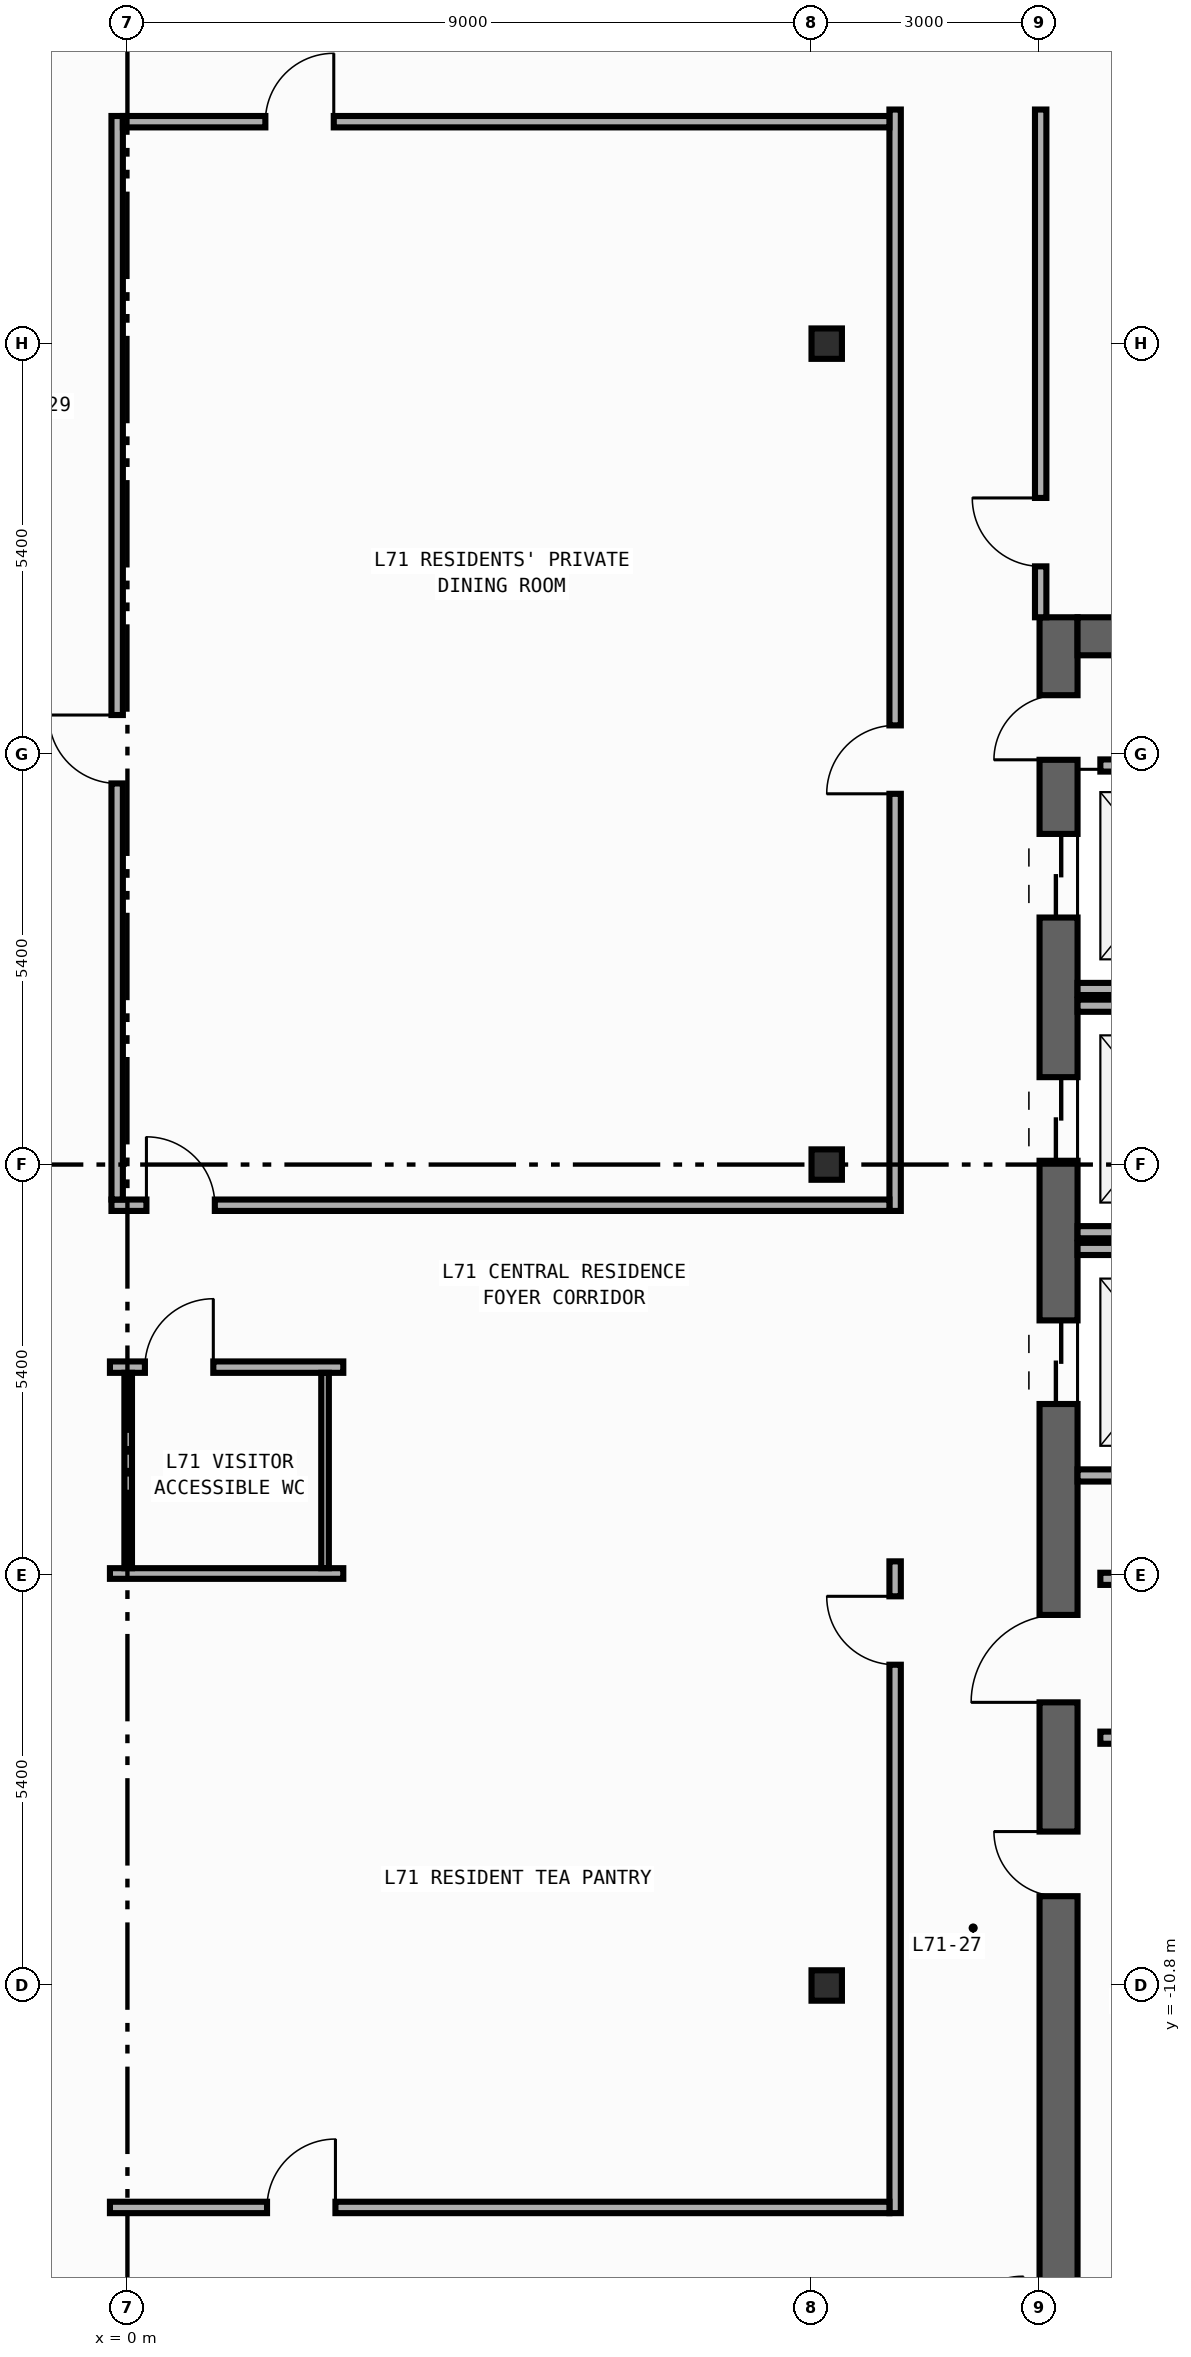
"""IFC4 building model, lengths in metres.
Left out: names, types, materials, properties, quantities, classifications, styles, units other than length and angle.
Written with IfcOpenShell. Run it as: python <this file> out.ifc"""

import sys

from ifc_helpers import new_model, si_unit, direction, frame, frame_2d, origin, origin_2d, place, context, subcontext, project, spatial, rectangle, i_section, extrude, element, fill, save


model = new_model("IFC4")
c1 = context("Model", 3, precision=1e-05, world=origin(), true_north=direction((0.0, 1.0)))
c2 = subcontext(c1, "Body", "Model", "MODEL_VIEW")
j1 = project(units=[si_unit("LENGTHUNIT", "METRE"), si_unit("PLANEANGLEUNIT", "RADIAN")], contexts=[c1])
p1 = place(None, origin())
s1 = spatial("IfcSite", under=j1, at=p1, CompositionType="ELEMENT")
p2 = place(p1, origin())
s2 = spatial("IfcBuilding", under=s1, at=p2, CompositionType="ELEMENT")
p3 = place(p2, frame((0.0, 0.0, 296.6)))
s3 = spatial("IfcBuildingStorey", under=s2, at=p3, CompositionType="ELEMENT", Elevation=296.6)
p4 = place(p3, frame((12.25, -19.8, 0.0), z_axis=(0.0, 0.0, 1.0), x_axis=(0.0, 1.0, 0.0)))
e1 = element("IfcWall", 1, at=p4, inside=s3, PredefinedType="SHEAR", context=c2, shape_type="SweptSolid", body=[
    extrude(rectangle(XDim=27.0, YDim=0.5, at=frame_2d((13.5, 0.0))), origin(), (0.0, 0.0, 1.0), 3.54),
])
p5 = place(p4, frame((23.05, 0.0, 0.0)))
e2 = element("IfcOpeningElement", 2, at=p5, cuts=e1, PredefinedType="OPENING", context=c2, shape_type="SweptSolid", body=[
    extrude(rectangle(XDim=1.1, YDim=2.2, at=frame_2d((0.55, 1.1))), frame((0.0, 0.26, 0.0), z_axis=(0.0, -1.0, 0.0), x_axis=(1.0, 0.0, 0.0)), (0.0, 0.0, 1.0), 0.52),
])
p6 = place(p4, frame((19.85, 0.0, 0.0)))
e3 = element("IfcOpeningElement", 3, at=p6, cuts=e1, PredefinedType="OPENING", context=c2, shape_type="SweptSolid", body=[
    extrude(rectangle(XDim=1.1, YDim=2.2, at=frame_2d((0.55, 1.1))), frame((0.0, 0.26, 0.0), z_axis=(0.0, -1.0, 0.0), x_axis=(1.0, 0.0, 0.0)), (0.0, 0.0, 1.0), 0.52),
])
p7 = place(p4, frame((16.65, 0.0, 0.0)))
e4 = element("IfcOpeningElement", 4, at=p7, cuts=e1, PredefinedType="OPENING", context=c2, shape_type="SweptSolid", body=[
    extrude(rectangle(XDim=1.1, YDim=2.2, at=frame_2d((0.55, 1.1))), frame((0.0, 0.26, 0.0), z_axis=(0.0, -1.0, 0.0), x_axis=(1.0, 0.0, 0.0)), (0.0, 0.0, 1.0), 0.52),
])
p8 = place(p4, frame((10.175, 0.0, 0.0)))
e5 = element("IfcOpeningElement", 5, at=p8, cuts=e1, PredefinedType="OPENING", context=c2, shape_type="SweptSolid", body=[
    extrude(rectangle(XDim=0.85, YDim=2.1, at=frame_2d((0.425, 1.05))), frame((0.0, 0.26, 0.0), z_axis=(0.0, -1.0, 0.0), x_axis=(1.0, 0.0, 0.0)), (0.0, 0.0, 1.0), 0.52),
])
p9 = place(p4, frame((12.725, 0.0, 0.0)))
e6 = element("IfcOpeningElement", 6, at=p9, cuts=e1, PredefinedType="OPENING", context=c2, shape_type="SweptSolid", body=[
    extrude(rectangle(XDim=1.15, YDim=2.2, at=frame_2d((0.575, 1.1))), frame((0.0, 0.26, 0.0), z_axis=(0.0, -1.0, 0.0), x_axis=(1.0, 0.0, 0.0)), (0.0, 0.0, 1.0), 0.52),
])
p10 = place(p4, frame((25.125, 0.0, 0.0)))
e7 = element("IfcOpeningElement", 7, at=p10, cuts=e1, PredefinedType="OPENING", context=c2, shape_type="SweptSolid", body=[
    extrude(rectangle(XDim=0.85, YDim=2.1, at=frame_2d((0.425, 1.05))), frame((0.0, 0.26, 0.0), z_axis=(0.0, -1.0, 0.0), x_axis=(1.0, 0.0, 0.0)), (0.0, 0.0, 1.0), 0.52),
])
p11 = place(p3, frame((12.5, 6.95, 0.0), z_axis=(0.0, 0.0, 1.0), x_axis=(1.0, 0.0, 0.0)))
e8 = element("IfcWall", 8, at=p11, inside=s3, PredefinedType="SHEAR", context=c2, shape_type="SweptSolid", body=[
    extrude(rectangle(XDim=7.4, YDim=0.5, at=frame_2d((3.7, 0.0))), origin(), (0.0, 0.0, 1.0), 3.54),
])
for number, where, z_axis, x_axis in (
    (9, (9.2, -10.8, 0.0), (0.0, 0.0, 1.0), (1.0, 0.0, 0.0)),
    (10, (9.2, 0.0, 0.0), (0.0, 0.0, 1.0), (1.0, 0.0, 0.0)),
    (11, (9.2, 10.8, 0.0), (0.0, 0.0, 1.0), (1.0, 0.0, 0.0)),
):
    element("IfcColumn", number, at=place(p3, frame(where, z_axis=z_axis, x_axis=x_axis)), inside=s3, PredefinedType="COLUMN", context=c2, shape_type="SweptSolid", body=[
        extrude(i_section(OverallWidth=0.4, OverallDepth=0.4, WebThickness=0.013, FlangeThickness=0.021, FilletRadius=0.022, at=origin_2d()), origin(), (0.0, 0.0, 1.0), 3.8),
    ])
for number, where, z_axis, x_axis in (
    (12, (12.5, 2.31, 0.0), (0.0, 0.0, 1.0), (1.0, 0.0, 0.0)),
    (13, (12.5, -0.89, 0.0), (0.0, 0.0, 1.0), (1.0, 0.0, 0.0)),
    (14, (12.5, 2.09, 0.0), (0.0, 0.0, 1.0), (1.0, 0.0, 0.0)),
    (15, (12.5, -4.09, 0.0), (0.0, 0.0, 1.0), (1.0, 0.0, 0.0)),
    (16, (12.5, -1.11, 0.0), (0.0, 0.0, 1.0), (1.0, 0.0, 0.0)),
):
    element("IfcWall", number, at=place(p3, frame(where, z_axis=z_axis, x_axis=x_axis)), inside=s3, PredefinedType="STANDARD", context=c2, shape_type="SweptSolid", body=[
        extrude(rectangle(XDim=2.49, YDim=0.16, at=frame_2d((1.245, 0.0))), origin(), (0.0, 0.0, 1.0), 3.54),
    ])
for number, where, z_axis, x_axis in (
    (17, (12.8, -5.45, 0.0), (0.0, 0.0, 1.0), (1.0, 0.0, 0.0)),
    (18, (12.8, -7.54, 0.0), (0.0, 0.0, 1.0), (1.0, 0.0, 0.0)),
    (19, (12.8, 5.25, 0.0), (0.0, 0.0, 1.0), (1.0, 0.0, 0.0)),
):
    element("IfcWall", number, at=place(p3, frame(where, z_axis=z_axis, x_axis=x_axis)), inside=s3, PredefinedType="STANDARD", context=c2, shape_type="SweptSolid", body=[
        extrude(rectangle(XDim=2.6, YDim=0.16, at=frame_2d((1.3, 0.0))), origin(), (0.0, 0.0, 1.0), 3.54),
    ])
p12 = place(p3, frame((12.015, 7.2, 0.0), z_axis=(0.0, 0.0, 1.0), x_axis=(0.0, 1.0, 0.0)))
e20 = element("IfcWall", 20, at=p12, inside=s3, PredefinedType="PARTITIONING", context=c2, shape_type="SweptSolid", body=[
    extrude(rectangle(XDim=6.68, YDim=0.15, at=frame_2d((3.34, 0.0))), origin(), (0.0, 0.0, 1.0), 3.54),
])
p13 = place(p12, frame((0.67, 0.0, 0.0)))
e21 = element("IfcOpeningElement", 21, at=p13, cuts=e20, PredefinedType="OPENING", context=c2, shape_type="SweptSolid", body=[
    extrude(rectangle(XDim=0.9, YDim=2.15, at=frame_2d((0.45, 1.075))), frame((0.0, 0.085, 0.0), z_axis=(0.0, -1.0, 0.0), x_axis=(1.0, 0.0, 0.0)), (0.0, 0.0, 1.0), 0.17),
])
p14 = place(p3, frame((10.1, -0.61, 0.0), z_axis=(0.0, 0.0, 1.0), x_axis=(0.0, 1.0, 0.0)))
e22 = element("IfcWall", 22, at=p14, inside=s3, PredefinedType="PARTITIONING", context=c2, shape_type="SweptSolid", body=[
    extrude(rectangle(XDim=14.49, YDim=0.15, at=frame_2d((7.245, 0.0))), origin(), (0.0, 0.0, 1.0), 3.54),
])
p15 = place(p14, frame((5.488, 0.0, 0.0)))
e23 = element("IfcOpeningElement", 23, at=p15, cuts=e22, PredefinedType="OPENING", context=c2, shape_type="SweptSolid", body=[
    extrude(rectangle(XDim=0.9, YDim=2.15, at=frame_2d((0.45, 1.075))), frame((0.0, 0.085, 0.0), z_axis=(0.0, -1.0, 0.0), x_axis=(1.0, 0.0, 0.0)), (0.0, 0.0, 1.0), 0.17),
])
p16 = place(p3, frame((10.1, -13.795, 0.0), z_axis=(0.0, 0.0, 1.0), x_axis=(0.0, 1.0, 0.0)))
e24 = element("IfcWall", 24, at=p16, inside=s3, PredefinedType="PARTITIONING", context=c2, shape_type="SweptSolid", body=[
    extrude(rectangle(XDim=8.575, YDim=0.15, at=frame_2d((4.288, 0.0))), origin(), (0.0, 0.0, 1.0), 3.54),
])
p17 = place(p16, frame((7.215, 0.0, 0.0)))
e25 = element("IfcOpeningElement", 25, at=p17, cuts=e24, PredefinedType="OPENING", context=c2, shape_type="SweptSolid", body=[
    extrude(rectangle(XDim=0.9, YDim=2.15, at=frame_2d((0.45, 1.075))), frame((0.0, 0.085, 0.0), z_axis=(0.0, -1.0, 0.0), x_axis=(1.0, 0.0, 0.0)), (0.0, 0.0, 1.0), 0.17),
])
p18 = place(p3, frame((-0.21, -0.535, 0.0), z_axis=(0.0, 0.0, 1.0), x_axis=(1.0, 0.0, 0.0)))
e26 = element("IfcWall", 26, at=p18, inside=s3, PredefinedType="PARTITIONING", context=c2, shape_type="SweptSolid", body=[
    extrude(rectangle(XDim=10.235, YDim=0.15, at=frame_2d((5.117, 0.0))), origin(), (0.0, 0.0, 1.0), 3.54),
])
p19 = place(p18, frame((0.46, 0.0, 0.0)))
e27 = element("IfcOpeningElement", 27, at=p19, cuts=e26, PredefinedType="OPENING", context=c2, shape_type="SweptSolid", body=[
    extrude(rectangle(XDim=0.9, YDim=2.15, at=frame_2d((0.45, 1.075))), frame((0.0, 0.085, 0.0), z_axis=(0.0, -1.0, 0.0), x_axis=(1.0, 0.0, 0.0)), (0.0, 0.0, 1.0), 0.17),
])
p20 = place(p3, frame((-0.23, -2.665, 0.0), z_axis=(0.0, 0.0, 1.0), x_axis=(1.0, 0.0, 0.0)))
e28 = element("IfcWall", 28, at=p20, inside=s3, PredefinedType="PARTITIONING", context=c2, shape_type="SweptSolid", body=[
    extrude(rectangle(XDim=3.07, YDim=0.15, at=frame_2d((1.535, 0.0))), origin(), (0.0, 0.0, 1.0), 3.54),
])
p21 = place(p20, frame((0.46, 0.0, 0.0)))
e29 = element("IfcOpeningElement", 29, at=p21, cuts=e28, PredefinedType="OPENING", context=c2, shape_type="SweptSolid", body=[
    extrude(rectangle(XDim=0.9, YDim=2.15, at=frame_2d((0.45, 1.075))), frame((0.0, 0.085, 0.0), z_axis=(0.0, -1.0, 0.0), x_axis=(1.0, 0.0, 0.0)), (0.0, 0.0, 1.0), 0.17),
])
p22 = place(p3, frame((-0.135, -0.46, 0.0), z_axis=(0.0, 0.0, 1.0), x_axis=(0.0, 1.0, 0.0)))
e30 = element("IfcWall", 30, at=p22, inside=s3, PredefinedType="PARTITIONING", context=c2, shape_type="SweptSolid", body=[
    extrude(rectangle(XDim=14.255, YDim=0.15, at=frame_2d((7.127, 0.0))), origin(), (0.0, 0.0, 1.0), 3.54),
])
p23 = place(p22, frame((5.474, 0.0, 0.0)))
e31 = element("IfcOpeningElement", 31, at=p23, cuts=e30, PredefinedType="OPENING", context=c2, shape_type="SweptSolid", body=[
    extrude(rectangle(XDim=0.9, YDim=2.15, at=frame_2d((0.45, 1.075))), frame((0.0, 0.085, 0.0), z_axis=(0.0, -1.0, 0.0), x_axis=(1.0, 0.0, 0.0)), (0.0, 0.0, 1.0), 0.17),
])
p24 = place(p3, frame((-0.06, 13.72, 0.0), z_axis=(0.0, 0.0, 1.0), x_axis=(1.0, 0.0, 0.0)))
e32 = element("IfcWall", 32, at=p24, inside=s3, PredefinedType="PARTITIONING", context=c2, shape_type="SweptSolid", body=[
    extrude(rectangle(XDim=10.085, YDim=0.15, at=frame_2d((5.042, 0.0))), origin(), (0.0, 0.0, 1.0), 3.54),
])
p25 = place(p24, frame((1.875, 0.0, 0.0)))
e33 = element("IfcOpeningElement", 33, at=p25, cuts=e32, PredefinedType="OPENING", context=c2, shape_type="SweptSolid", body=[
    extrude(rectangle(XDim=0.9, YDim=2.15, at=frame_2d((0.45, 1.075))), frame((0.0, 0.085, 0.0), z_axis=(0.0, -1.0, 0.0), x_axis=(1.0, 0.0, 0.0)), (0.0, 0.0, 1.0), 0.17),
])
p26 = place(p3, frame((-0.23, -13.72, 0.0), z_axis=(0.0, 0.0, 1.0), x_axis=(1.0, 0.0, 0.0)))
e34 = element("IfcWall", 34, at=p26, inside=s3, PredefinedType="PARTITIONING", context=c2, shape_type="SweptSolid", body=[
    extrude(rectangle(XDim=10.255, YDim=0.15, at=frame_2d((5.127, 0.0))), origin(), (0.0, 0.0, 1.0), 3.54),
])
p27 = place(p26, frame((2.067, 0.0, 0.0)))
e35 = element("IfcOpeningElement", 35, at=p27, cuts=e34, PredefinedType="OPENING", context=c2, shape_type="SweptSolid", body=[
    extrude(rectangle(XDim=0.9, YDim=2.15, at=frame_2d((0.45, 1.075))), frame((0.0, 0.085, 0.0), z_axis=(0.0, -1.0, 0.0), x_axis=(1.0, 0.0, 0.0)), (0.0, 0.0, 1.0), 0.17),
])
p28 = place(p3, frame((-0.23, -5.38, 0.0), z_axis=(0.0, 0.0, 1.0), x_axis=(1.0, 0.0, 0.0)))
e36 = element("IfcWall", 36, at=p28, inside=s3, PredefinedType="PARTITIONING", context=c2, shape_type="SweptSolid", body=[
    extrude(rectangle(XDim=3.07, YDim=0.14, at=frame_2d((1.535, 0.0))), origin(), (0.0, 0.0, 1.0), 3.54),
])
for number, where, z_axis, x_axis in (
    (37, (2.6, -2.74, 0.0), (0.0, 0.0, 1.0), (0.0, -1.0, 0.0)),
    (38, (0.01, -5.31, 0.0), (0.0, 0.0, 1.0), (0.0, 1.0, 0.0)),
):
    element("IfcWall", number, at=place(p3, frame(where, z_axis=z_axis, x_axis=x_axis)), inside=s3, PredefinedType="PARTITIONING", context=c2, shape_type="SweptSolid", body=[
        extrude(rectangle(XDim=2.57, YDim=0.1, at=frame_2d((1.285, 0.0))), origin(), (0.0, 0.0, 1.0), 3.54),
    ])
p29 = place(p5, origin())
e39 = element("IfcDoor", 39, at=p29, inside=s3, OperationType="DOUBLE_DOOR_SLIDING", PredefinedType="DOOR", context=c2, shape_type="SweptSolid", body=[
    extrude(rectangle(XDim=1.1, YDim=2.2, at=frame_2d((0.55, 1.1))), frame((0.0, 0.025, 0.0), z_axis=(0.0, -1.0, 0.0), x_axis=(1.0, 0.0, 0.0)), (0.0, 0.0, 1.0), 0.05),
])
fill(e2, e39)
p30 = place(p6, origin())
e40 = element("IfcDoor", 40, at=p30, inside=s3, OperationType="DOUBLE_DOOR_SLIDING", PredefinedType="DOOR", context=c2, shape_type="SweptSolid", body=[
    extrude(rectangle(XDim=1.1, YDim=2.2, at=frame_2d((0.55, 1.1))), frame((0.0, 0.025, 0.0), z_axis=(0.0, -1.0, 0.0), x_axis=(1.0, 0.0, 0.0)), (0.0, 0.0, 1.0), 0.05),
])
fill(e3, e40)
p31 = place(p7, origin())
e41 = element("IfcDoor", 41, at=p31, inside=s3, OperationType="DOUBLE_DOOR_SLIDING", PredefinedType="DOOR", context=c2, shape_type="SweptSolid", body=[
    extrude(rectangle(XDim=1.1, YDim=2.2, at=frame_2d((0.55, 1.1))), frame((0.0, 0.025, 0.0), z_axis=(0.0, -1.0, 0.0), x_axis=(1.0, 0.0, 0.0)), (0.0, 0.0, 1.0), 0.05),
])
fill(e4, e41)
p32 = place(p8, origin())
e42 = element("IfcDoor", 42, at=p32, inside=s3, OperationType="SINGLE_SWING_RIGHT", PredefinedType="DOOR", context=c2, shape_type="SweptSolid", body=[
    extrude(rectangle(XDim=0.85, YDim=2.1, at=frame_2d((0.425, 1.05))), frame((0.0, 0.025, 0.0), z_axis=(0.0, -1.0, 0.0), x_axis=(1.0, 0.0, 0.0)), (0.0, 0.0, 1.0), 0.05),
])
fill(e5, e42)
p33 = place(p9, origin())
e43 = element("IfcDoor", 43, at=p33, inside=s3, OperationType="SINGLE_SWING_LEFT", PredefinedType="DOOR", context=c2, shape_type="SweptSolid", body=[
    extrude(rectangle(XDim=1.15, YDim=2.2, at=frame_2d((0.575, 1.1))), frame((0.0, 0.025, 0.0), z_axis=(0.0, -1.0, 0.0), x_axis=(1.0, 0.0, 0.0)), (0.0, 0.0, 1.0), 0.05),
])
fill(e6, e43)
p34 = place(p10, origin())
e44 = element("IfcDoor", 44, at=p34, inside=s3, OperationType="SINGLE_SWING_LEFT", PredefinedType="DOOR", context=c2, shape_type="SweptSolid", body=[
    extrude(rectangle(XDim=0.85, YDim=2.1, at=frame_2d((0.425, 1.05))), frame((0.0, 0.025, 0.0), z_axis=(0.0, -1.0, 0.0), x_axis=(1.0, 0.0, 0.0)), (0.0, 0.0, 1.0), 0.05),
])
fill(e7, e44)
p35 = place(p13, origin())
e45 = element("IfcDoor", 45, at=p35, inside=s3, OperationType="SINGLE_SWING_RIGHT", PredefinedType="DOOR", context=c2, shape_type="SweptSolid", body=[
    extrude(rectangle(XDim=0.9, YDim=2.15, at=frame_2d((0.45, 1.075))), frame((0.0, 0.025, 0.0), z_axis=(0.0, -1.0, 0.0), x_axis=(1.0, 0.0, 0.0)), (0.0, 0.0, 1.0), 0.05),
])
fill(e21, e45)
p36 = place(p15, origin())
e46 = element("IfcDoor", 46, at=p36, inside=s3, OperationType="SINGLE_SWING_LEFT", PredefinedType="DOOR", context=c2, shape_type="SweptSolid", body=[
    extrude(rectangle(XDim=0.9, YDim=2.15, at=frame_2d((0.45, 1.075))), frame((0.0, 0.025, 0.0), z_axis=(0.0, -1.0, 0.0), x_axis=(1.0, 0.0, 0.0)), (0.0, 0.0, 1.0), 0.05),
])
fill(e23, e46)
p37 = place(p17, origin())
e47 = element("IfcDoor", 47, at=p37, inside=s3, OperationType="SINGLE_SWING_RIGHT", PredefinedType="DOOR", context=c2, shape_type="SweptSolid", body=[
    extrude(rectangle(XDim=0.9, YDim=2.15, at=frame_2d((0.45, 1.075))), frame((0.0, 0.025, 0.0), z_axis=(0.0, -1.0, 0.0), x_axis=(1.0, 0.0, 0.0)), (0.0, 0.0, 1.0), 0.05),
])
fill(e25, e47)
p38 = place(p19, origin())
e48 = element("IfcDoor", 48, at=p38, inside=s3, OperationType="SINGLE_SWING_LEFT", PredefinedType="DOOR", context=c2, shape_type="SweptSolid", body=[
    extrude(rectangle(XDim=0.9, YDim=2.15, at=frame_2d((0.45, 1.075))), frame((0.0, 0.025, 0.0), z_axis=(0.0, -1.0, 0.0), x_axis=(1.0, 0.0, 0.0)), (0.0, 0.0, 1.0), 0.05),
])
fill(e27, e48)
p39 = place(p21, origin())
e49 = element("IfcDoor", 49, at=p39, inside=s3, OperationType="SINGLE_SWING_RIGHT", PredefinedType="DOOR", context=c2, shape_type="SweptSolid", body=[
    extrude(rectangle(XDim=0.9, YDim=2.15, at=frame_2d((0.45, 1.075))), frame((0.0, 0.025, 0.0), z_axis=(0.0, -1.0, 0.0), x_axis=(1.0, 0.0, 0.0)), (0.0, 0.0, 1.0), 0.05),
])
fill(e29, e49)
p40 = place(p23, origin())
e50 = element("IfcDoor", 50, at=p40, inside=s3, OperationType="SINGLE_SWING_RIGHT", PredefinedType="DOOR", context=c2, shape_type="SweptSolid", body=[
    extrude(rectangle(XDim=0.9, YDim=2.15, at=frame_2d((0.45, 1.075))), frame((0.0, 0.025, 0.0), z_axis=(0.0, -1.0, 0.0), x_axis=(1.0, 0.0, 0.0)), (0.0, 0.0, 1.0), 0.05),
])
fill(e31, e50)
p41 = place(p25, origin())
e51 = element("IfcDoor", 51, at=p41, inside=s3, OperationType="SINGLE_SWING_RIGHT", PredefinedType="DOOR", context=c2, shape_type="SweptSolid", body=[
    extrude(rectangle(XDim=0.9, YDim=2.15, at=frame_2d((0.45, 1.075))), frame((0.0, 0.025, 0.0), z_axis=(0.0, -1.0, 0.0), x_axis=(1.0, 0.0, 0.0)), (0.0, 0.0, 1.0), 0.05),
])
fill(e33, e51)
p42 = place(p27, origin())
e52 = element("IfcDoor", 52, at=p42, inside=s3, OperationType="SINGLE_SWING_RIGHT", PredefinedType="DOOR", context=c2, shape_type="SweptSolid", body=[
    extrude(rectangle(XDim=0.9, YDim=2.15, at=frame_2d((0.45, 1.075))), frame((0.0, 0.025, 0.0), z_axis=(0.0, -1.0, 0.0), x_axis=(1.0, 0.0, 0.0)), (0.0, 0.0, 1.0), 0.05),
])
fill(e35, e52)
save(model, sys.argv[1])
